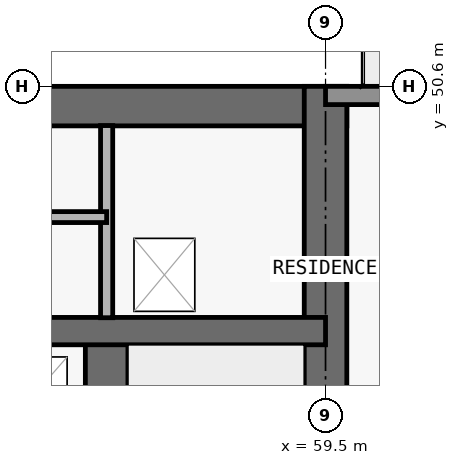
"""IFC4 building model, lengths in metres.
Left out: names, types, materials, properties, quantities, classifications, styles, units other than length and angle.
Written with IfcOpenShell. Run it as: python <this file> out.ifc"""

import sys

from ifc_helpers import new_model, si_unit, direction, frame, frame_2d, origin, place, context, subcontext, project, spatial, rectangle, extrude, element, save


model = new_model("IFC4")
c1 = context("Model", 3, precision=1e-05, world=origin(), true_north=direction((0.0, 1.0)))
c2 = subcontext(c1, "Body", "Model", "MODEL_VIEW")
j1 = project(units=[si_unit("LENGTHUNIT", "METRE"), si_unit("PLANEANGLEUNIT", "RADIAN")], contexts=[c1])
p1 = place(None, origin())
s1 = spatial("IfcSite", under=j1, at=p1, CompositionType="ELEMENT")
p2 = place(p1, origin())
s2 = spatial("IfcBuilding", under=s1, at=p2, CompositionType="ELEMENT")
p3 = place(p2, frame((0.0, 0.0, 204.9)))
s3 = spatial("IfcBuildingStorey", under=s2, at=p3, CompositionType="ELEMENT", Elevation=204.9)
p4 = place(p3, frame((17.95, 50.275, 0.0), z_axis=(0.0, 0.0, 1.0), x_axis=(1.0, 0.0, 0.0)))
e1 = element("IfcWall", 1, at=p4, inside=s3, PredefinedType="SHEAR", context=c2, shape_type="SweptSolid", body=[
    extrude(rectangle(XDim=41.9, YDim=0.65, at=frame_2d((20.95, 0.0))), origin(), (0.0, 0.0, 1.0), 3.05),
])
p5 = place(p3, frame((59.5, 36.65, 0.0), z_axis=(0.0, 0.0, 1.0), x_axis=(0.0, 1.0, 0.0)))
e2 = element("IfcWall", 2, at=p5, inside=s3, PredefinedType="SHEAR", context=c2, shape_type="SweptSolid", body=[
    extrude(rectangle(XDim=13.95, YDim=0.7, at=frame_2d((6.975, 0.0))), origin(), (0.0, 0.0, 1.0), 3.05),
])
p6 = place(p3, frame((55.9, 37.0, 0.0), z_axis=(0.0, 0.0, 1.0), x_axis=(0.0, 1.0, 0.0)))
e3 = element("IfcWall", 3, at=p6, inside=s3, PredefinedType="SHEAR", context=c2, shape_type="SweptSolid", body=[
    extrude(rectangle(XDim=9.575, YDim=0.7, at=frame_2d((4.788, 0.0))), origin(), (0.0, 0.0, 1.0), 3.05),
])
p7 = place(p6, frame((0.55, 0.0, 0.0)))
e4 = element("IfcOpeningElement", 4, at=p7, cuts=e3, PredefinedType="OPENING", context=c2, shape_type="SweptSolid", body=[
    extrude(rectangle(XDim=1.1, YDim=2.15, at=frame_2d((0.55, 1.075))), frame((0.0, 0.36, 0.0), z_axis=(0.0, -1.0, 0.0), x_axis=(1.0, 0.0, 0.0)), (0.0, 0.0, 1.0), 0.72),
])
p8 = place(p3, frame((18.3, 46.575, 0.0), z_axis=(0.0, 0.0, 1.0), x_axis=(1.0, 0.0, 0.0)))
e5 = element("IfcWall", 5, at=p8, inside=s3, PredefinedType="SHEAR", context=c2, shape_type="SweptSolid", body=[
    extrude(rectangle(XDim=41.2, YDim=0.45, at=frame_2d((20.6, 0.0))), origin(), (0.0, 0.0, 1.0), 3.05),
])
p9 = place(p8, frame((7.6, 0.0, 0.0)))
e6 = element("IfcOpeningElement", 6, at=p9, cuts=e5, PredefinedType="OPENING", context=c2, shape_type="SweptSolid", body=[
    extrude(rectangle(XDim=1.0, YDim=2.2, at=frame_2d((0.5, 1.1))), frame((0.0, 0.235, 0.0), z_axis=(0.0, -1.0, 0.0), x_axis=(1.0, 0.0, 0.0)), (0.0, 0.0, 1.0), 0.47),
])
p10 = place(p8, frame((32.625, 0.0, 0.0)))
e7 = element("IfcOpeningElement", 7, at=p10, cuts=e5, PredefinedType="OPENING", context=c2, shape_type="SweptSolid", body=[
    extrude(rectangle(XDim=1.05, YDim=2.15, at=frame_2d((0.525, 1.075))), frame((0.0, 0.235, 0.0), z_axis=(0.0, -1.0, 0.0), x_axis=(1.0, 0.0, 0.0)), (0.0, 0.0, 1.0), 0.47),
])
p11 = place(p3, frame((59.5, 50.45, 0.0), z_axis=(0.0, 0.0, 1.0), x_axis=(1.0, 0.0, 0.0)))
e8 = element("IfcWall", 8, at=p11, inside=s3, PredefinedType="STANDARD", context=c2, shape_type="SweptSolid", body=[
    extrude(rectangle(XDim=8.2, YDim=0.3, at=frame_2d((4.1, 0.0))), origin(), (0.0, 0.0, 1.0), 3.05),
])
p12 = place(p11, frame((3.1, 0.0, 0.0)))
e9 = element("IfcOpeningElement", 9, at=p12, cuts=e8, PredefinedType="OPENING", context=c2, shape_type="SweptSolid", body=[
    extrude(rectangle(XDim=2.0, YDim=2.3, at=frame_2d((1.0, 1.15))), frame((0.0, 0.16, 0.0), z_axis=(0.0, -1.0, 0.0), x_axis=(1.0, 0.0, 0.0)), (0.0, 0.0, 1.0), 0.32),
])
p13 = place(p3, frame((55.9, 46.795, 0.0), z_axis=(0.0, 0.0, 1.0), x_axis=(0.0, 1.0, 0.0)))
e10 = element("IfcWall", 10, at=p13, inside=s3, PredefinedType="PARTITIONING", context=c2, shape_type="SweptSolid", body=[
    extrude(rectangle(XDim=3.16, YDim=0.2, at=frame_2d((1.58, 0.0))), origin(), (0.0, 0.0, 1.0), 3.05),
])
p14 = place(p3, frame((41.2, 48.45, 0.0), z_axis=(0.0, 0.0, 1.0), x_axis=(1.0, 0.0, 0.0)))
e11 = element("IfcWall", 11, at=p14, inside=s3, PredefinedType="PARTITIONING", context=c2, shape_type="SweptSolid", body=[
    extrude(rectangle(XDim=14.7, YDim=0.18, at=frame_2d((7.35, 0.0))), origin(), (0.0, 0.0, 1.0), 3.05),
])
p15 = place(p14, frame((1.85, 0.0, 0.0)))
e12 = element("IfcOpeningElement", 12, at=p15, cuts=e11, PredefinedType="OPENING", context=c2, shape_type="SweptSolid", body=[
    extrude(rectangle(XDim=1.2, YDim=2.2, at=frame_2d((0.6, 1.1))), frame((0.0, 0.1, 0.0), z_axis=(0.0, -1.0, 0.0), x_axis=(1.0, 0.0, 0.0)), (0.0, 0.0, 1.0), 0.2),
])
p16 = place(p14, frame((6.75, 0.0, 0.0)))
e13 = element("IfcOpeningElement", 13, at=p16, cuts=e11, PredefinedType="OPENING", context=c2, shape_type="SweptSolid", body=[
    extrude(rectangle(XDim=1.2, YDim=2.2, at=frame_2d((0.6, 1.1))), frame((0.0, 0.1, 0.0), z_axis=(0.0, -1.0, 0.0), x_axis=(1.0, 0.0, 0.0)), (0.0, 0.0, 1.0), 0.2),
])
p17 = place(p14, frame((11.825, 0.0, 0.0)))
e14 = element("IfcOpeningElement", 14, at=p17, cuts=e11, PredefinedType="OPENING", context=c2, shape_type="SweptSolid", body=[
    extrude(rectangle(XDim=0.85, YDim=2.1, at=frame_2d((0.425, 1.05))), frame((0.0, 0.1, 0.0), z_axis=(0.0, -1.0, 0.0), x_axis=(1.0, 0.0, 0.0)), (0.0, 0.0, 1.0), 0.2),
])
save(model, sys.argv[1])
